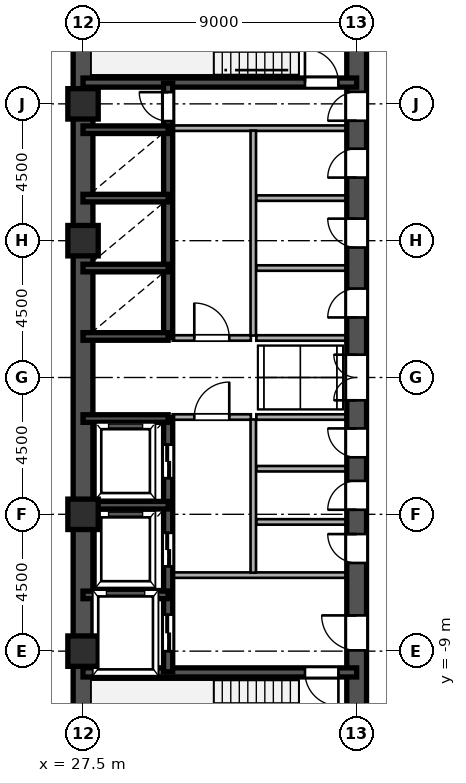
"""IFC4 building model, lengths in metres.
Left out: names, types, materials, properties, quantities, classifications, styles, units other than length and angle.
Written with IfcOpenShell. Run it as: python <this file> out.ifc"""

import sys

from ifc_helpers import new_model, si_unit, direction, frame, frame_2d, origin, origin_2d, place, context, subcontext, project, spatial, rectangle, hollow_rectangle, extrude, source, transform, mapped, element, fill, save


model = new_model("IFC4")
c1 = context("Model", 3, precision=1e-05, world=origin(), true_north=direction((0.0, 1.0)))
c2 = subcontext(c1, "Body", "Model", "MODEL_VIEW")
j1 = project(units=[si_unit("LENGTHUNIT", "METRE"), si_unit("PLANEANGLEUNIT", "RADIAN")], contexts=[c1])
p1 = place(None, origin())
s1 = spatial("IfcSite", under=j1, at=p1, CompositionType="ELEMENT")
p2 = place(p1, origin())
s2 = spatial("IfcBuilding", under=s1, at=p2, CompositionType="ELEMENT")
p3 = place(p2, frame((0.0, 0.0, 124.8)))
s3 = spatial("IfcBuildingStorey", under=s2, at=p3, CompositionType="ELEMENT", Elevation=124.8)
m1 = source(origin(), c2, "Body", "SweptSolid", [
    extrude(hollow_rectangle(XDim=1.0, YDim=1.0, WallThickness=0.042, at=origin_2d()), origin(), (0.0, 0.0, 1.0), 3.6),
])
for number, where, z_axis, x_axis in (
    (1, (27.5, -9.0, 0.0), (0.0, 0.0, 1.0), (1.0, 0.0, 0.0)),
    (2, (27.5, -4.5, 0.0), (0.0, 0.0, 1.0), (1.0, 0.0, 0.0)),
    (3, (27.5, 4.5, 0.0), (0.0, 0.0, 1.0), (1.0, 0.0, 0.0)),
    (4, (27.5, 9.0, 0.0), (0.0, 0.0, 1.0), (1.0, 0.0, 0.0)),
):
    element("IfcColumn", number, at=place(p3, frame(where, z_axis=z_axis, x_axis=x_axis)), inside=s3, PredefinedType="COLUMN", context=c2, shape_type="MappedRepresentation", body=[
        mapped(m1, transform((0.0, 0.0, 0.0), scale=1.0)),
    ])
for number, where, z_axis, x_axis in (
    (5, (27.5, -13.5, 0.0), (0.0, 0.0, 1.0), (0.0, 1.0, 0.0)),
    (6, (27.5, 1.3, 0.0), (0.0, 0.0, 1.0), (0.0, 1.0, 0.0)),
):
    element("IfcWall", number, at=place(p3, frame(where, z_axis=z_axis, x_axis=x_axis)), inside=s3, PredefinedType="SHEAR", context=c2, shape_type="SweptSolid", body=[
        extrude(rectangle(XDim=12.2, YDim=0.65, at=frame_2d((6.1, 0.0))), origin(), (0.0, 0.0, 1.0), 3.38),
    ])
p4 = place(p3, frame((27.5, -1.3, 0.0), z_axis=(0.0, 0.0, 1.0), x_axis=(0.0, 1.0, 0.0)))
e7 = element("IfcWall", 7, at=p4, inside=s3, PredefinedType="SHEAR", context=c2, shape_type="SweptSolid", body=[
    extrude(rectangle(XDim=2.6, YDim=0.65, at=frame_2d((1.3, 0.0))), origin(), (0.0, 0.0, 1.0), 3.38),
])
p5 = place(p3, frame((36.5, -13.65, 0.0), z_axis=(0.0, 0.0, 1.0), x_axis=(0.0, 1.0, 0.0)))
e8 = element("IfcWall", 8, at=p5, inside=s3, PredefinedType="SHEAR", context=c2, shape_type="SweptSolid", body=[
    extrude(rectangle(XDim=7.15, YDim=0.65, at=frame_2d((3.575, 0.0))), origin(), (0.0, 0.0, 1.0), 3.38),
])
p6 = place(p5, frame((4.675, 0.0, 0.0)))
e9 = element("IfcOpeningElement", 9, at=p6, cuts=e8, PredefinedType="OPENING", context=c2, shape_type="SweptSolid", body=[
    extrude(rectangle(XDim=1.15, YDim=2.2, at=frame_2d((0.575, 1.1))), frame((0.0, 0.335, 0.0), z_axis=(0.0, -1.0, 0.0), x_axis=(1.0, 0.0, 0.0)), (0.0, 0.0, 1.0), 0.67),
])
p7 = place(p3, frame((36.5, -1.3, 0.0), z_axis=(0.0, 0.0, 1.0), x_axis=(0.0, 1.0, 0.0)))
e10 = element("IfcWall", 10, at=p7, inside=s3, PredefinedType="SHEAR", context=c2, shape_type="SweptSolid", body=[
    extrude(rectangle(XDim=2.6, YDim=0.65, at=frame_2d((1.3, 0.0))), origin(), (0.0, 0.0, 1.0), 3.38),
])
p8 = place(p7, frame((0.55, 0.0, 0.0)))
e11 = element("IfcOpeningElement", 11, at=p8, cuts=e10, PredefinedType="OPENING", context=c2, shape_type="SweptSolid", body=[
    extrude(rectangle(XDim=1.5, YDim=2.3, at=frame_2d((0.75, 1.15))), frame((0.0, 0.335, 0.0), z_axis=(0.0, -1.0, 0.0), x_axis=(1.0, 0.0, 0.0)), (0.0, 0.0, 1.0), 0.67),
])
p9 = place(p3, frame((36.5, 8.2, 0.0), z_axis=(0.0, 0.0, 1.0), x_axis=(0.0, 1.0, 0.0)))
e12 = element("IfcWall", 12, at=p9, inside=s3, PredefinedType="SHEAR", context=c2, shape_type="SweptSolid", body=[
    extrude(rectangle(XDim=5.45, YDim=0.65, at=frame_2d((2.725, 0.0))), origin(), (0.0, 0.0, 1.0), 3.38),
])
p10 = place(p9, frame((0.245, 0.0, 0.0)))
e13 = element("IfcOpeningElement", 13, at=p10, cuts=e12, PredefinedType="OPENING", context=c2, shape_type="SweptSolid", body=[
    extrude(rectangle(XDim=0.95, YDim=2.15, at=frame_2d((0.475, 1.075))), frame((0.0, 0.335, 0.0), z_axis=(0.0, -1.0, 0.0), x_axis=(1.0, 0.0, 0.0)), (0.0, 0.0, 1.0), 0.67),
])
p11 = place(p3, frame((36.5, -6.5, 0.0), z_axis=(0.0, 0.0, 1.0), x_axis=(0.0, 1.0, 0.0)))
e14 = element("IfcWall", 14, at=p11, inside=s3, PredefinedType="SHEAR", context=c2, shape_type="SweptSolid", body=[
    extrude(rectangle(XDim=1.75, YDim=0.65, at=frame_2d((0.875, 0.0))), origin(), (0.0, 0.0, 1.0), 3.38),
])
p12 = place(p11, frame((0.4, 0.0, 0.0)))
e15 = element("IfcOpeningElement", 15, at=p12, cuts=e14, PredefinedType="OPENING", context=c2, shape_type="SweptSolid", body=[
    extrude(rectangle(XDim=0.95, YDim=2.15, at=frame_2d((0.475, 1.075))), frame((0.0, 0.335, 0.0), z_axis=(0.0, -1.0, 0.0), x_axis=(1.0, 0.0, 0.0)), (0.0, 0.0, 1.0), 0.67),
])
p13 = place(p3, frame((36.5, -4.75, 0.0), z_axis=(0.0, 0.0, 1.0), x_axis=(0.0, 1.0, 0.0)))
e16 = element("IfcWall", 16, at=p13, inside=s3, PredefinedType="SHEAR", context=c2, shape_type="SweptSolid", body=[
    extrude(rectangle(XDim=1.75, YDim=0.65, at=frame_2d((0.875, 0.0))), origin(), (0.0, 0.0, 1.0), 3.38),
])
p14 = place(p13, frame((0.4, 0.0, 0.0)))
e17 = element("IfcOpeningElement", 17, at=p14, cuts=e16, PredefinedType="OPENING", context=c2, shape_type="SweptSolid", body=[
    extrude(rectangle(XDim=0.95, YDim=2.15, at=frame_2d((0.475, 1.075))), frame((0.0, 0.335, 0.0), z_axis=(0.0, -1.0, 0.0), x_axis=(1.0, 0.0, 0.0)), (0.0, 0.0, 1.0), 0.67),
])
p15 = place(p3, frame((36.5, -3.0, 0.0), z_axis=(0.0, 0.0, 1.0), x_axis=(0.0, 1.0, 0.0)))
e18 = element("IfcWall", 18, at=p15, inside=s3, PredefinedType="SHEAR", context=c2, shape_type="SweptSolid", body=[
    extrude(rectangle(XDim=1.7, YDim=0.65, at=frame_2d((0.85, 0.0))), origin(), (0.0, 0.0, 1.0), 3.38),
])
p16 = place(p15, frame((0.375, 0.0, 0.0)))
e19 = element("IfcOpeningElement", 19, at=p16, cuts=e18, PredefinedType="OPENING", context=c2, shape_type="SweptSolid", body=[
    extrude(rectangle(XDim=0.95, YDim=2.15, at=frame_2d((0.475, 1.075))), frame((0.0, 0.335, 0.0), z_axis=(0.0, -1.0, 0.0), x_axis=(1.0, 0.0, 0.0)), (0.0, 0.0, 1.0), 0.67),
])
p17 = place(p3, frame((36.5, 1.3, 0.0), z_axis=(0.0, 0.0, 1.0), x_axis=(0.0, 1.0, 0.0)))
e20 = element("IfcWall", 20, at=p17, inside=s3, PredefinedType="SHEAR", context=c2, shape_type="SweptSolid", body=[
    extrude(rectangle(XDim=2.3, YDim=0.65, at=frame_2d((1.15, 0.0))), origin(), (0.0, 0.0, 1.0), 3.38),
])
p18 = place(p17, frame((0.675, 0.0, 0.0)))
e21 = element("IfcOpeningElement", 21, at=p18, cuts=e20, PredefinedType="OPENING", context=c2, shape_type="SweptSolid", body=[
    extrude(rectangle(XDim=0.95, YDim=2.15, at=frame_2d((0.475, 1.075))), frame((0.0, 0.335, 0.0), z_axis=(0.0, -1.0, 0.0), x_axis=(1.0, 0.0, 0.0)), (0.0, 0.0, 1.0), 0.67),
])
p19 = place(p3, frame((36.5, 3.6, 0.0), z_axis=(0.0, 0.0, 1.0), x_axis=(0.0, 1.0, 0.0)))
e22 = element("IfcWall", 22, at=p19, inside=s3, PredefinedType="SHEAR", context=c2, shape_type="SweptSolid", body=[
    extrude(rectangle(XDim=2.3, YDim=0.65, at=frame_2d((1.15, 0.0))), origin(), (0.0, 0.0, 1.0), 3.38),
])
p20 = place(p19, frame((0.675, 0.0, 0.0)))
e23 = element("IfcOpeningElement", 23, at=p20, cuts=e22, PredefinedType="OPENING", context=c2, shape_type="SweptSolid", body=[
    extrude(rectangle(XDim=0.95, YDim=2.15, at=frame_2d((0.475, 1.075))), frame((0.0, 0.335, 0.0), z_axis=(0.0, -1.0, 0.0), x_axis=(1.0, 0.0, 0.0)), (0.0, 0.0, 1.0), 0.67),
])
p21 = place(p3, frame((36.5, 5.9, 0.0), z_axis=(0.0, 0.0, 1.0), x_axis=(0.0, 1.0, 0.0)))
e24 = element("IfcWall", 24, at=p21, inside=s3, PredefinedType="SHEAR", context=c2, shape_type="SweptSolid", body=[
    extrude(rectangle(XDim=2.3, YDim=0.65, at=frame_2d((1.15, 0.0))), origin(), (0.0, 0.0, 1.0), 3.38),
])
p22 = place(p21, frame((0.675, 0.0, 0.0)))
e25 = element("IfcOpeningElement", 25, at=p22, cuts=e24, PredefinedType="OPENING", context=c2, shape_type="SweptSolid", body=[
    extrude(rectangle(XDim=0.95, YDim=2.15, at=frame_2d((0.475, 1.075))), frame((0.0, 0.335, 0.0), z_axis=(0.0, -1.0, 0.0), x_axis=(1.0, 0.0, 0.0)), (0.0, 0.0, 1.0), 0.67),
])
p23 = place(p3, frame((27.5, -9.7, 0.0), z_axis=(0.0, 0.0, 1.0), x_axis=(1.0, 0.0, 0.0)))
e26 = element("IfcWall", 26, at=p23, inside=s3, PredefinedType="SHEAR", context=c2, shape_type="SweptSolid", body=[
    extrude(rectangle(XDim=9.0, YDim=0.3, at=frame_2d((4.5, 0.0))), origin(), (0.0, 0.0, 1.0), 3.38),
])
p24 = place(p23, frame((7.3, 0.0, 0.0)))
e27 = element("IfcOpeningElement", 27, at=p24, cuts=e26, PredefinedType="OPENING", context=c2, shape_type="SweptSolid", body=[
    extrude(rectangle(XDim=1.1, YDim=2.2, at=frame_2d((0.55, 1.1))), frame((0.0, 0.16, 0.0), z_axis=(0.0, -1.0, 0.0), x_axis=(1.0, 0.0, 0.0)), (0.0, 0.0, 1.0), 0.32),
])
p25 = place(p3, frame((27.5, 9.7, 0.0), z_axis=(0.0, 0.0, 1.0), x_axis=(1.0, 0.0, 0.0)))
e28 = element("IfcWall", 28, at=p25, inside=s3, PredefinedType="SHEAR", context=c2, shape_type="SweptSolid", body=[
    extrude(rectangle(XDim=9.0, YDim=0.3, at=frame_2d((4.5, 0.0))), origin(), (0.0, 0.0, 1.0), 3.38),
])
p26 = place(p25, frame((7.3, 0.0, 0.0)))
e29 = element("IfcOpeningElement", 29, at=p26, cuts=e28, PredefinedType="OPENING", context=c2, shape_type="SweptSolid", body=[
    extrude(rectangle(XDim=1.1, YDim=2.2, at=frame_2d((0.55, 1.1))), frame((0.0, 0.16, 0.0), z_axis=(0.0, -1.0, 0.0), x_axis=(1.0, 0.0, 0.0)), (0.0, 0.0, 1.0), 0.32),
])
for number, where, z_axis, x_axis in (
    (30, (27.5, -7.15, 0.0), (0.0, 0.0, 1.0), (1.0, 0.0, 0.0)),
    (31, (27.5, -4.2, 0.0), (0.0, 0.0, 1.0), (1.0, 0.0, 0.0)),
    (32, (27.5, -1.35, 0.0), (0.0, 0.0, 1.0), (1.0, 0.0, 0.0)),
    (33, (27.5, 1.35, 0.0), (0.0, 0.0, 1.0), (1.0, 0.0, 0.0)),
    (34, (27.5, 3.6, 0.0), (0.0, 0.0, 1.0), (1.0, 0.0, 0.0)),
    (35, (27.5, 5.9, 0.0), (0.0, 0.0, 1.0), (1.0, 0.0, 0.0)),
    (36, (27.5, 8.15, 0.0), (0.0, 0.0, 1.0), (1.0, 0.0, 0.0)),
):
    element("IfcWall", number, at=place(p3, frame(where, z_axis=z_axis, x_axis=x_axis)), inside=s3, PredefinedType="SHEAR", context=c2, shape_type="SweptSolid", body=[
        extrude(rectangle(XDim=2.8, YDim=0.25, at=frame_2d((1.4, 0.0))), origin(), (0.0, 0.0, 1.0), 3.38),
    ])
p27 = place(p3, frame((30.3, -9.68, 0.0), z_axis=(0.0, 0.0, 1.0), x_axis=(0.0, 1.0, 0.0)))
e37 = element("IfcWall", 37, at=p27, inside=s3, PredefinedType="SHEAR", context=c2, shape_type="SweptSolid", body=[
    extrude(rectangle(XDim=2.56, YDim=0.3, at=frame_2d((1.28, 0.0))), origin(), (0.0, 0.0, 1.0), 3.38),
])
p28 = place(p27, frame((0.68, 0.0, 0.0)))
e38 = element("IfcOpeningElement", 38, at=p28, cuts=e37, PredefinedType="OPENING", context=c2, shape_type="SweptSolid", body=[
    extrude(rectangle(XDim=1.2, YDim=2.25, at=frame_2d((0.6, 1.125))), frame((0.0, 0.16, 0.0), z_axis=(0.0, -1.0, 0.0), x_axis=(1.0, 0.0, 0.0)), (0.0, 0.0, 1.0), 0.32),
])
p29 = place(p3, frame((30.3, -7.12, 0.0), z_axis=(0.0, 0.0, 1.0), x_axis=(0.0, 1.0, 0.0)))
e39 = element("IfcWall", 39, at=p29, inside=s3, PredefinedType="SHEAR", context=c2, shape_type="SweptSolid", body=[
    extrude(rectangle(XDim=2.92, YDim=0.3, at=frame_2d((1.46, 0.0))), origin(), (0.0, 0.0, 1.0), 3.38),
])
p30 = place(p29, frame((0.91, 0.0, 0.0)))
e40 = element("IfcOpeningElement", 40, at=p30, cuts=e39, PredefinedType="OPENING", context=c2, shape_type="SweptSolid", body=[
    extrude(rectangle(XDim=1.1, YDim=2.2, at=frame_2d((0.55, 1.1))), frame((0.0, 0.16, 0.0), z_axis=(0.0, -1.0, 0.0), x_axis=(1.0, 0.0, 0.0)), (0.0, 0.0, 1.0), 0.32),
])
p31 = place(p3, frame((30.3, -4.2, 0.0), z_axis=(0.0, 0.0, 1.0), x_axis=(0.0, 1.0, 0.0)))
e41 = element("IfcWall", 41, at=p31, inside=s3, PredefinedType="SHEAR", context=c2, shape_type="SweptSolid", body=[
    extrude(rectangle(XDim=2.88, YDim=0.3, at=frame_2d((1.44, 0.0))), origin(), (0.0, 0.0, 1.0), 3.38),
])
p32 = place(p31, frame((0.89, 0.0, 0.0)))
e42 = element("IfcOpeningElement", 42, at=p32, cuts=e41, PredefinedType="OPENING", context=c2, shape_type="SweptSolid", body=[
    extrude(rectangle(XDim=1.1, YDim=2.2, at=frame_2d((0.55, 1.1))), frame((0.0, 0.16, 0.0), z_axis=(0.0, -1.0, 0.0), x_axis=(1.0, 0.0, 0.0)), (0.0, 0.0, 1.0), 0.32),
])
p33 = place(p3, frame((30.3, 1.32, 0.0), z_axis=(0.0, 0.0, 1.0), x_axis=(0.0, 1.0, 0.0)))
e43 = element("IfcWall", 43, at=p33, inside=s3, PredefinedType="SHEAR", context=c2, shape_type="SweptSolid", body=[
    extrude(rectangle(XDim=2.28, YDim=0.3, at=frame_2d((1.14, 0.0))), origin(), (0.0, 0.0, 1.0), 3.38),
])
p34 = place(p3, frame((30.3, 3.6, 0.0), z_axis=(0.0, 0.0, 1.0), x_axis=(0.0, 1.0, 0.0)))
e44 = element("IfcWall", 44, at=p34, inside=s3, PredefinedType="SHEAR", context=c2, shape_type="SweptSolid", body=[
    extrude(rectangle(XDim=2.3, YDim=0.3, at=frame_2d((1.15, 0.0))), origin(), (0.0, 0.0, 1.0), 3.38),
])
p35 = place(p3, frame((30.3, 5.9, 0.0), z_axis=(0.0, 0.0, 1.0), x_axis=(0.0, 1.0, 0.0)))
e45 = element("IfcWall", 45, at=p35, inside=s3, PredefinedType="SHEAR", context=c2, shape_type="SweptSolid", body=[
    extrude(rectangle(XDim=2.25, YDim=0.3, at=frame_2d((1.125, 0.0))), origin(), (0.0, 0.0, 1.0), 3.38),
])
p36 = place(p3, frame((30.3, 8.15, 0.0), z_axis=(0.0, 0.0, 1.0), x_axis=(0.0, 1.0, 0.0)))
e46 = element("IfcWall", 46, at=p36, inside=s3, PredefinedType="SHEAR", context=c2, shape_type="SweptSolid", body=[
    extrude(rectangle(XDim=1.53, YDim=0.3, at=frame_2d((0.765, 0.0))), origin(), (0.0, 0.0, 1.0), 3.38),
])
p37 = place(p36, frame((0.285, 0.0, 0.0)))
e47 = element("IfcOpeningElement", 47, at=p37, cuts=e46, PredefinedType="OPENING", context=c2, shape_type="SweptSolid", body=[
    extrude(rectangle(XDim=0.95, YDim=2.15, at=frame_2d((0.475, 1.075))), frame((0.0, 0.16, 0.0), z_axis=(0.0, -1.0, 0.0), x_axis=(1.0, 0.0, 0.0)), (0.0, 0.0, 1.0), 0.32),
])
for number, where, z_axis, x_axis in (
    (48, (30.45, -6.5, 0.0), (0.0, 0.0, 1.0), (1.0, 0.0, 0.0)),
    (49, (30.45, 8.2, 0.0), (0.0, 0.0, 1.0), (1.0, 0.0, 0.0)),
):
    element("IfcWall", number, at=place(p3, frame(where, z_axis=z_axis, x_axis=x_axis)), inside=s3, PredefinedType="PARTITIONING", context=c2, shape_type="SweptSolid", body=[
        extrude(rectangle(XDim=5.7, YDim=0.18, at=frame_2d((2.85, 0.0))), origin(), (0.0, 0.0, 1.0), 3.38),
    ])
p38 = place(p3, frame((33.1, -6.42, 0.0), z_axis=(0.0, 0.0, 1.0), x_axis=(0.0, 1.0, 0.0)))
e50 = element("IfcWall", 50, at=p38, inside=s3, PredefinedType="PARTITIONING", context=c2, shape_type="SweptSolid", body=[
    extrude(rectangle(XDim=5.04, YDim=0.18, at=frame_2d((2.52, 0.0))), origin(), (0.0, 0.0, 1.0), 3.38),
])
p39 = place(p3, frame((33.1, 1.38, 0.0), z_axis=(0.0, 0.0, 1.0), x_axis=(0.0, 1.0, 0.0)))
e51 = element("IfcWall", 51, at=p39, inside=s3, PredefinedType="PARTITIONING", context=c2, shape_type="SweptSolid", body=[
    extrude(rectangle(XDim=6.74, YDim=0.18, at=frame_2d((3.37, 0.0))), origin(), (0.0, 0.0, 1.0), 3.38),
])
p40 = place(p3, frame((30.45, -1.3, 0.0), z_axis=(0.0, 0.0, 1.0), x_axis=(1.0, 0.0, 0.0)))
e52 = element("IfcWall", 52, at=p40, inside=s3, PredefinedType="PARTITIONING", context=c2, shape_type="SweptSolid", body=[
    extrude(rectangle(XDim=2.57, YDim=0.18, at=frame_2d((1.285, 0.0))), origin(), (0.0, 0.0, 1.0), 3.38),
])
p41 = place(p40, frame((0.71, 0.0, 0.0)))
e53 = element("IfcOpeningElement", 53, at=p41, cuts=e52, PredefinedType="OPENING", context=c2, shape_type="SweptSolid", body=[
    extrude(rectangle(XDim=1.15, YDim=2.2, at=frame_2d((0.575, 1.1))), frame((0.0, 0.1, 0.0), z_axis=(0.0, -1.0, 0.0), x_axis=(1.0, 0.0, 0.0)), (0.0, 0.0, 1.0), 0.2),
])
p42 = place(p3, frame((30.45, 1.3, 0.0), z_axis=(0.0, 0.0, 1.0), x_axis=(1.0, 0.0, 0.0)))
e54 = element("IfcWall", 54, at=p42, inside=s3, PredefinedType="PARTITIONING", context=c2, shape_type="SweptSolid", body=[
    extrude(rectangle(XDim=2.57, YDim=0.18, at=frame_2d((1.285, 0.0))), origin(), (0.0, 0.0, 1.0), 3.38),
])
p43 = place(p42, frame((0.71, 0.0, 0.0)))
e55 = element("IfcOpeningElement", 55, at=p43, cuts=e54, PredefinedType="OPENING", context=c2, shape_type="SweptSolid", body=[
    extrude(rectangle(XDim=1.15, YDim=2.2, at=frame_2d((0.575, 1.1))), frame((0.0, 0.1, 0.0), z_axis=(0.0, -1.0, 0.0), x_axis=(1.0, 0.0, 0.0)), (0.0, 0.0, 1.0), 0.2),
])
for number, where, z_axis, x_axis in (
    (56, (33.2, -1.3, 0.0), (0.0, 0.0, 1.0), (1.0, 0.0, 0.0)),
    (57, (33.2, 1.3, 0.0), (0.0, 0.0, 1.0), (1.0, 0.0, 0.0)),
    (58, (33.2, -4.75, 0.0), (0.0, 0.0, 1.0), (1.0, 0.0, 0.0)),
    (59, (33.2, -3.0, 0.0), (0.0, 0.0, 1.0), (1.0, 0.0, 0.0)),
    (60, (33.2, 3.6, 0.0), (0.0, 0.0, 1.0), (1.0, 0.0, 0.0)),
    (61, (33.2, 5.9, 0.0), (0.0, 0.0, 1.0), (1.0, 0.0, 0.0)),
):
    element("IfcWall", number, at=place(p3, frame(where, z_axis=z_axis, x_axis=x_axis)), inside=s3, PredefinedType="PARTITIONING", context=c2, shape_type="SweptSolid", body=[
        extrude(rectangle(XDim=2.95, YDim=0.18, at=frame_2d((1.475, 0.0))), origin(), (0.0, 0.0, 1.0), 3.38),
    ])
m2 = source(origin(), c2, "Body", "SweptSolid", [
    extrude(rectangle(XDim=1.15, YDim=2.2, at=frame_2d((0.575, 1.1))), frame((0.0, 0.025, 0.0), z_axis=(0.0, -1.0, 0.0), x_axis=(1.0, 0.0, 0.0)), (0.0, 0.0, 1.0), 0.05),
])
p44 = place(p6, origin())
e62 = element("IfcDoor", 62, at=p44, inside=s3, OperationType="SINGLE_SWING_RIGHT", PredefinedType="DOOR", context=c2, shape_type="MappedRepresentation", body=[
    mapped(m2, transform((0.0, 0.0, 0.0), scale=1.0)),
])
fill(e9, e62)
m3 = source(origin(), c2, "Body", "SweptSolid", [
    extrude(rectangle(XDim=1.5, YDim=2.3, at=frame_2d((0.75, 1.15))), frame((0.0, 0.025, 0.0), z_axis=(0.0, -1.0, 0.0), x_axis=(1.0, 0.0, 0.0)), (0.0, 0.0, 1.0), 0.05),
])
p45 = place(p8, origin())
e63 = element("IfcDoor", 63, at=p45, inside=s3, OperationType="DOUBLE_SWING_LEFT", PredefinedType="DOOR", context=c2, shape_type="MappedRepresentation", body=[
    mapped(m3, transform((0.0, 0.0, 0.0), scale=1.0)),
])
fill(e11, e63)
m4 = source(origin(), c2, "Body", "SweptSolid", [
    extrude(rectangle(XDim=0.95, YDim=2.15, at=frame_2d((0.475, 1.075))), frame((0.0, 0.025, 0.0), z_axis=(0.0, -1.0, 0.0), x_axis=(1.0, 0.0, 0.0)), (0.0, 0.0, 1.0), 0.05),
])
p46 = place(p10, origin())
e64 = element("IfcDoor", 64, at=p46, inside=s3, OperationType="SINGLE_SWING_LEFT", PredefinedType="DOOR", context=c2, shape_type="MappedRepresentation", body=[
    mapped(m4, transform((0.0, 0.0, 0.0), scale=1.0)),
])
fill(e13, e64)
p47 = place(p12, origin())
e65 = element("IfcDoor", 65, at=p47, inside=s3, OperationType="SINGLE_SWING_RIGHT", PredefinedType="DOOR", context=c2, shape_type="MappedRepresentation", body=[
    mapped(m4, transform((0.0, 0.0, 0.0), scale=1.0)),
])
fill(e15, e65)
p48 = place(p14, origin())
e66 = element("IfcDoor", 66, at=p48, inside=s3, OperationType="SINGLE_SWING_LEFT", PredefinedType="DOOR", context=c2, shape_type="MappedRepresentation", body=[
    mapped(m4, transform((0.0, 0.0, 0.0), scale=1.0)),
])
fill(e17, e66)
p49 = place(p16, origin())
e67 = element("IfcDoor", 67, at=p49, inside=s3, OperationType="SINGLE_SWING_RIGHT", PredefinedType="DOOR", context=c2, shape_type="MappedRepresentation", body=[
    mapped(m4, transform((0.0, 0.0, 0.0), scale=1.0)),
])
fill(e19, e67)
p50 = place(p18, origin())
e68 = element("IfcDoor", 68, at=p50, inside=s3, OperationType="SINGLE_SWING_LEFT", PredefinedType="DOOR", context=c2, shape_type="MappedRepresentation", body=[
    mapped(m4, transform((0.0, 0.0, 0.0), scale=1.0)),
])
fill(e21, e68)
p51 = place(p20, origin())
e69 = element("IfcDoor", 69, at=p51, inside=s3, OperationType="SINGLE_SWING_RIGHT", PredefinedType="DOOR", context=c2, shape_type="MappedRepresentation", body=[
    mapped(m4, transform((0.0, 0.0, 0.0), scale=1.0)),
])
fill(e23, e69)
p52 = place(p22, origin())
e70 = element("IfcDoor", 70, at=p52, inside=s3, OperationType="SINGLE_SWING_LEFT", PredefinedType="DOOR", context=c2, shape_type="MappedRepresentation", body=[
    mapped(m4, transform((0.0, 0.0, 0.0), scale=1.0)),
])
fill(e25, e70)
m5 = source(origin(), c2, "Body", "SweptSolid", [
    extrude(rectangle(XDim=1.1, YDim=2.2, at=frame_2d((0.55, 1.1))), frame((0.0, 0.025, 0.0), z_axis=(0.0, -1.0, 0.0), x_axis=(1.0, 0.0, 0.0)), (0.0, 0.0, 1.0), 0.05),
])
p53 = place(p24, frame((1.1, 0.0, 0.0), z_axis=(0.0, 0.0, 1.0), x_axis=(-1.0, 0.0, 0.0)))
e71 = element("IfcDoor", 71, at=p53, inside=s3, OperationType="SINGLE_SWING_RIGHT", PredefinedType="DOOR", context=c2, shape_type="MappedRepresentation", body=[
    mapped(m5, transform((0.0, 0.0, 0.0), scale=1.0)),
])
fill(e27, e71)
p54 = place(p26, origin())
e72 = element("IfcDoor", 72, at=p54, inside=s3, OperationType="SINGLE_SWING_LEFT", PredefinedType="DOOR", context=c2, shape_type="MappedRepresentation", body=[
    mapped(m5, transform((0.0, 0.0, 0.0), scale=1.0)),
])
fill(e29, e72)
m6 = source(origin(), c2, "Body", "SweptSolid", [
    extrude(rectangle(XDim=1.2, YDim=2.25, at=frame_2d((0.6, 1.125))), frame((0.0, 0.025, 0.0), z_axis=(0.0, -1.0, 0.0), x_axis=(1.0, 0.0, 0.0)), (0.0, 0.0, 1.0), 0.05),
])
p55 = place(p28, origin())
e73 = element("IfcDoor", 73, at=p55, inside=s3, OperationType="DOUBLE_DOOR_SLIDING", PredefinedType="DOOR", context=c2, shape_type="MappedRepresentation", body=[
    mapped(m6, transform((0.0, 0.0, 0.0), scale=1.0)),
])
fill(e38, e73)
m7 = source(origin(), c2, "Body", "SweptSolid", [
    extrude(rectangle(XDim=1.1, YDim=2.2, at=frame_2d((0.55, 1.1))), frame((0.0, 0.025, 0.0), z_axis=(0.0, -1.0, 0.0), x_axis=(1.0, 0.0, 0.0)), (0.0, 0.0, 1.0), 0.05),
])
p56 = place(p30, origin())
e74 = element("IfcDoor", 74, at=p56, inside=s3, OperationType="DOUBLE_DOOR_SLIDING", PredefinedType="DOOR", context=c2, shape_type="MappedRepresentation", body=[
    mapped(m7, transform((0.0, 0.0, 0.0), scale=1.0)),
])
fill(e40, e74)
p57 = place(p32, origin())
e75 = element("IfcDoor", 75, at=p57, inside=s3, OperationType="DOUBLE_DOOR_SLIDING", PredefinedType="DOOR", context=c2, shape_type="MappedRepresentation", body=[
    mapped(m7, transform((0.0, 0.0, 0.0), scale=1.0)),
])
fill(e42, e75)
p58 = place(p37, origin())
e76 = element("IfcDoor", 76, at=p58, inside=s3, OperationType="SINGLE_SWING_RIGHT", PredefinedType="DOOR", context=c2, shape_type="MappedRepresentation", body=[
    mapped(m4, transform((0.0, 0.0, 0.0), scale=1.0)),
])
fill(e47, e76)
p59 = place(p41, origin())
e77 = element("IfcDoor", 77, at=p59, inside=s3, OperationType="SINGLE_SWING_RIGHT", PredefinedType="DOOR", context=c2, shape_type="MappedRepresentation", body=[
    mapped(m2, transform((0.0, 0.0, 0.0), scale=1.0)),
])
fill(e53, e77)
p60 = place(p43, origin())
e78 = element("IfcDoor", 78, at=p60, inside=s3, OperationType="SINGLE_SWING_LEFT", PredefinedType="DOOR", context=c2, shape_type="MappedRepresentation", body=[
    mapped(m2, transform((0.0, 0.0, 0.0), scale=1.0)),
])
fill(e55, e78)
save(model, sys.argv[1])
